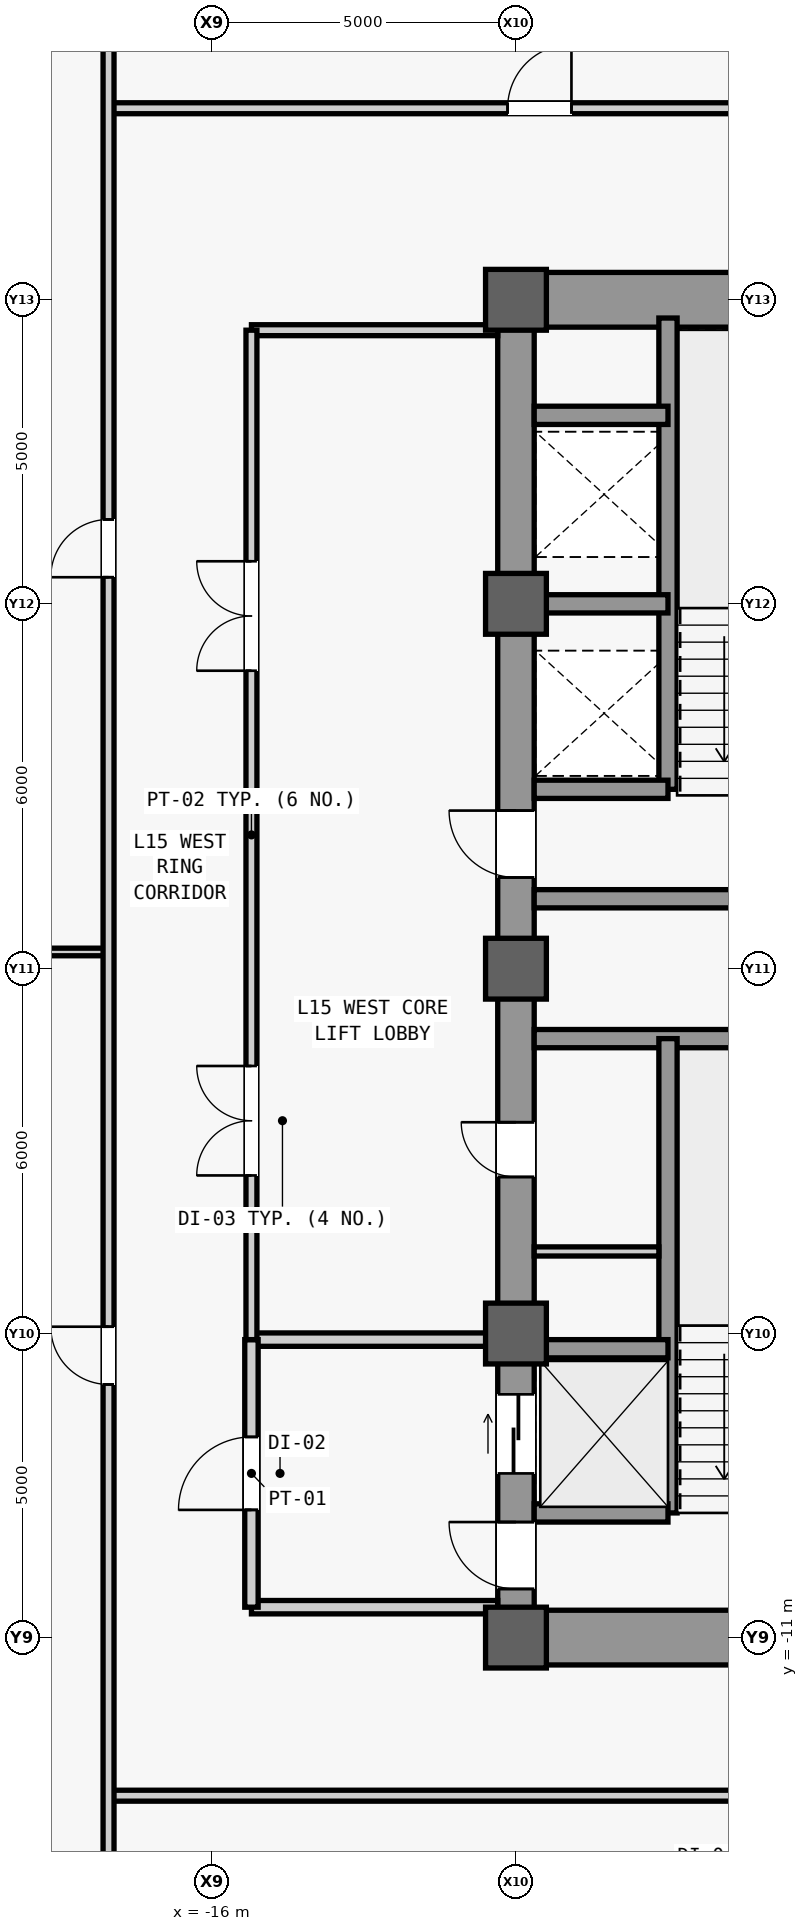
"""IFC4 building model, lengths in metres.
Left out: names, types, materials, properties, quantities, classifications, styles, units other than length and angle.
Written with IfcOpenShell. Run it as: python <this file> out.ifc"""

import sys

from ifc_helpers import new_model, si_unit, direction, frame, frame_2d, origin, origin_2d, place, context, subcontext, project, spatial, rectangle, extrude, source, transform, mapped, element, fill, save


model = new_model("IFC4")
c1 = context("Model", 3, precision=1e-05, world=origin(), true_north=direction((0.0, 1.0)))
c2 = subcontext(c1, "Body", "Model", "MODEL_VIEW")
j1 = project(units=[si_unit("LENGTHUNIT", "METRE"), si_unit("PLANEANGLEUNIT", "RADIAN")], contexts=[c1])
p1 = place(None, origin())
s1 = spatial("IfcSite", under=j1, at=p1, CompositionType="ELEMENT")
p2 = place(p1, origin())
s2 = spatial("IfcBuilding", under=s1, at=p2, CompositionType="ELEMENT")
p3 = place(p2, frame((0.0, 0.0, 70.4)))
s3 = spatial("IfcBuildingStorey", under=s2, at=p3, CompositionType="ELEMENT", Elevation=70.4)
m1 = source(origin(), c2, "Body", "SweptSolid", [
    extrude(rectangle(XDim=22.0, YDim=0.6, at=frame_2d((11.0, 0.0))), origin(), (0.0, 0.0, 1.0), 3.94),
])
p4 = place(p3, frame((-11.0, -11.0, 0.0), z_axis=(0.0, 0.0, 1.0), x_axis=(0.0, 1.0, 0.0)))
e1 = element("IfcWall", 1, at=p4, inside=s3, PredefinedType="SHEAR", context=c2, shape_type="MappedRepresentation", body=[
    mapped(m1, transform((0.0, 0.0, 0.0), scale=1.0)),
])
m2 = source(origin(), c2, "Body", "SweptSolid", [
    extrude(rectangle(XDim=1.1, YDim=2.2, at=frame_2d((0.55, 1.1))), frame((0.0, 0.31, 0.0), z_axis=(0.0, -1.0, 0.0), x_axis=(1.0, 0.0, 0.0)), (0.0, 0.0, 1.0), 0.62),
])
p5 = place(p4, frame((0.8, 0.0, 0.0)))
e2 = element("IfcOpeningElement", 2, at=p5, cuts=e1, PredefinedType="OPENING", context=c2, shape_type="MappedRepresentation", body=[
    mapped(m2, transform((0.0, 0.0, 0.0), scale=1.0)),
])
p6 = place(p4, frame((12.5, 0.0, 0.0)))
e3 = element("IfcOpeningElement", 3, at=p6, cuts=e1, PredefinedType="OPENING", context=c2, shape_type="MappedRepresentation", body=[
    mapped(m2, transform((0.0, 0.0, 0.0), scale=1.0)),
])
m3 = source(origin(), c2, "Body", "SweptSolid", [
    extrude(rectangle(XDim=0.9, YDim=2.15, at=frame_2d((0.45, 1.075))), frame((0.0, 0.31, 0.0), z_axis=(0.0, -1.0, 0.0), x_axis=(1.0, 0.0, 0.0)), (0.0, 0.0, 1.0), 0.62),
])
p7 = place(p4, frame((7.575, 0.0, 0.0)))
e4 = element("IfcOpeningElement", 4, at=p7, cuts=e1, PredefinedType="OPENING", context=c2, shape_type="MappedRepresentation", body=[
    mapped(m3, transform((0.0, 0.0, 0.0), scale=1.0)),
])
m4 = source(origin(), c2, "Body", "SweptSolid", [
    extrude(rectangle(XDim=1.3, YDim=2.3, at=frame_2d((0.65, 1.15))), frame((0.0, 0.31, 0.0), z_axis=(0.0, -1.0, 0.0), x_axis=(1.0, 0.0, 0.0)), (0.0, 0.0, 1.0), 0.62),
])
p8 = place(p4, frame((2.7, 0.0, 0.0)))
e5 = element("IfcOpeningElement", 5, at=p8, cuts=e1, PredefinedType="OPENING", context=c2, shape_type="MappedRepresentation", body=[
    mapped(m4, transform((0.0, 0.0, 0.0), scale=1.0)),
])
m5 = source(origin(), c2, "Body", "SweptSolid", [
    extrude(rectangle(XDim=5.85, YDim=0.9, at=frame_2d((2.925, 0.0))), origin(), (0.0, 0.0, 1.0), 3.94),
])
for number, where, z_axis, x_axis in (
    (6, (-10.7, -11.0, 0.0), (0.0, 0.0, 1.0), (1.0, 0.0, 0.0)),
    (7, (-10.7, 11.0, 0.0), (0.0, 0.0, 1.0), (1.0, 0.0, 0.0)),
):
    element("IfcWall", number, at=place(p3, frame(where, z_axis=z_axis, x_axis=x_axis)), inside=s3, PredefinedType="SHEAR", context=c2, shape_type="MappedRepresentation", body=[
        mapped(m5, transform((0.0, 0.0, 0.0), scale=1.0)),
    ])
m6 = source(origin(), c2, "Body", "SweptSolid", [
    extrude(rectangle(XDim=5.6, YDim=0.3, at=frame_2d((2.8, 0.0))), origin(), (0.0, 0.0, 1.0), 3.94),
])
for number, where, z_axis, x_axis in (
    (8, (-10.7, -1.15, 0.0), (0.0, 0.0, 1.0), (1.0, 0.0, 0.0)),
    (9, (-10.7, 1.15, 0.0), (0.0, 0.0, 1.0), (1.0, 0.0, 0.0)),
):
    element("IfcWall", number, at=place(p3, frame(where, z_axis=z_axis, x_axis=x_axis)), inside=s3, PredefinedType="SHEAR", context=c2, shape_type="MappedRepresentation", body=[
        mapped(m6, transform((0.0, 0.0, 0.0), scale=1.0)),
    ])
m7 = source(origin(), c2, "Body", "SweptSolid", [
    extrude(rectangle(XDim=1.0, YDim=1.0, at=origin_2d()), origin(), (0.0, 0.0, 1.0), 4.2),
])
for number, where, z_axis, x_axis in (
    (10, (-11.0, -11.0, 0.0), (0.0, 0.0, 1.0), (1.0, 0.0, 0.0)),
    (11, (-11.0, -6.0, 0.0), (0.0, 0.0, 1.0), (1.0, 0.0, 0.0)),
    (12, (-11.0, 0.0, 0.0), (0.0, 0.0, 1.0), (1.0, 0.0, 0.0)),
    (13, (-11.0, 6.0, 0.0), (0.0, 0.0, 1.0), (1.0, 0.0, 0.0)),
    (14, (-11.0, 11.0, 0.0), (0.0, 0.0, 1.0), (1.0, 0.0, 0.0)),
):
    element("IfcColumn", number, at=place(p3, frame(where, z_axis=z_axis, x_axis=x_axis)), inside=s3, PredefinedType="COLUMN", context=c2, shape_type="MappedRepresentation", body=[
        mapped(m7, transform((0.0, 0.0, 0.0), scale=1.0)),
    ])
m8 = source(origin(), c2, "Body", "SweptSolid", [
    extrude(rectangle(XDim=7.8, YDim=0.3, at=frame_2d((3.9, 0.0))), origin(), (0.0, 0.0, 1.0), 3.94),
])
p9 = place(p3, frame((-8.5, -8.95, 0.0), z_axis=(0.0, 0.0, 1.0), x_axis=(0.0, 1.0, 0.0)))
e15 = element("IfcWall", 15, at=p9, inside=s3, PredefinedType="SHEAR", context=c2, shape_type="MappedRepresentation", body=[
    mapped(m8, transform((0.0, 0.0, 0.0), scale=1.0)),
])
m9 = source(origin(), c2, "Body", "SweptSolid", [
    extrude(rectangle(XDim=2.2, YDim=0.3, at=frame_2d((1.1, 0.0))), origin(), (0.0, 0.0, 1.0), 3.94),
])
for number, where, z_axis, x_axis in (
    (16, (-10.7, -8.95, 0.0), (0.0, 0.0, 1.0), (1.0, 0.0, 0.0)),
    (17, (-10.7, -6.25, 0.0), (0.0, 0.0, 1.0), (1.0, 0.0, 0.0)),
):
    element("IfcWall", number, at=place(p3, frame(where, z_axis=z_axis, x_axis=x_axis)), inside=s3, PredefinedType="SHEAR", context=c2, shape_type="MappedRepresentation", body=[
        mapped(m9, transform((0.0, 0.0, 0.0), scale=1.0)),
    ])
m10 = source(origin(), c2, "Body", "SweptSolid", [
    extrude(rectangle(XDim=7.75, YDim=0.3, at=frame_2d((3.875, 0.0))), origin(), (0.0, 0.0, 1.0), 3.94),
])
p10 = place(p3, frame((-8.5, 2.95, 0.0), z_axis=(0.0, 0.0, 1.0), x_axis=(0.0, 1.0, 0.0)))
e18 = element("IfcWall", 18, at=p10, inside=s3, PredefinedType="SHEAR", context=c2, shape_type="MappedRepresentation", body=[
    mapped(m10, transform((0.0, 0.0, 0.0), scale=1.0)),
])
for number, where, z_axis, x_axis in (
    (19, (-10.7, 2.95, 0.0), (0.0, 0.0, 1.0), (1.0, 0.0, 0.0)),
    (20, (-10.7, 6.0, 0.0), (0.0, 0.0, 1.0), (1.0, 0.0, 0.0)),
    (21, (-10.7, 9.1, 0.0), (0.0, 0.0, 1.0), (1.0, 0.0, 0.0)),
):
    element("IfcWall", number, at=place(p3, frame(where, z_axis=z_axis, x_axis=x_axis)), inside=s3, PredefinedType="SHEAR", context=c2, shape_type="MappedRepresentation", body=[
        mapped(m9, transform((0.0, 0.0, 0.0), scale=1.0)),
    ])
m11 = source(origin(), c2, "Body", "SweptSolid", [
    extrude(rectangle(XDim=2.05, YDim=0.15, at=frame_2d((1.025, 0.0))), origin(), (0.0, 0.0, 1.0), 3.94),
])
p11 = place(p3, frame((-10.7, -4.65, 0.0), z_axis=(0.0, 0.0, 1.0), x_axis=(1.0, 0.0, 0.0)))
e22 = element("IfcWall", 22, at=p11, inside=s3, PredefinedType="PARTITIONING", context=c2, shape_type="MappedRepresentation", body=[
    mapped(m11, transform((0.0, 0.0, 0.0), scale=1.0)),
])
m12 = source(origin(), c2, "Body", "SweptSolid", [
    extrude(rectangle(XDim=4.05, YDim=0.22, at=frame_2d((2.025, 0.0))), origin(), (0.0, 0.0, 1.0), 3.94),
])
p12 = place(p3, frame((-15.35, -10.5, 0.0), z_axis=(0.0, 0.0, 1.0), x_axis=(1.0, 0.0, 0.0)))
e23 = element("IfcWall", 23, at=p12, inside=s3, PredefinedType="PARTITIONING", context=c2, shape_type="MappedRepresentation", body=[
    mapped(m12, transform((0.0, 0.0, 0.0), scale=1.0)),
])
m13 = source(origin(), c2, "Body", "SweptSolid", [
    extrude(rectangle(XDim=4.05, YDim=0.22, at=frame_2d((2.025, 0.0))), origin(), (0.0, 0.0, 1.0), 3.085),
])
p13 = place(p3, frame((-15.35, -6.1, 0.0), z_axis=(0.0, 0.0, 1.0), x_axis=(1.0, 0.0, 0.0)))
e24 = element("IfcWall", 24, at=p13, inside=s3, PredefinedType="PARTITIONING", context=c2, shape_type="MappedRepresentation", body=[
    mapped(m13, transform((0.0, 0.0, 0.0), scale=1.0)),
])
m14 = source(origin(), c2, "Body", "SweptSolid", [
    extrude(rectangle(XDim=4.4, YDim=0.22, at=frame_2d((2.2, 0.0))), origin(), (0.0, 0.0, 1.0), 3.94),
])
p14 = place(p3, frame((-15.35, -10.5, 0.0), z_axis=(0.0, 0.0, 1.0), x_axis=(0.0, 1.0, 0.0)))
e25 = element("IfcWall", 25, at=p14, inside=s3, PredefinedType="PARTITIONING", context=c2, shape_type="MappedRepresentation", body=[
    mapped(m14, transform((0.0, 0.0, 0.0), scale=1.0)),
])
m15 = source(origin(), c2, "Body", "SweptSolid", [
    extrude(rectangle(XDim=1.2, YDim=2.2, at=frame_2d((0.6, 1.1))), frame((0.0, 0.12, 0.0), z_axis=(0.0, -1.0, 0.0), x_axis=(1.0, 0.0, 0.0)), (0.0, 0.0, 1.0), 0.24),
])
p15 = place(p14, frame((1.6, 0.0, 0.0)))
e26 = element("IfcOpeningElement", 26, at=p15, cuts=e25, PredefinedType="OPENING", context=c2, shape_type="MappedRepresentation", body=[
    mapped(m15, transform((0.0, 0.0, 0.0), scale=1.0)),
])
m16 = source(origin(), c2, "Body", "SweptSolid", [
    extrude(rectangle(XDim=4.05, YDim=0.18, at=frame_2d((2.025, 0.0))), origin(), (0.0, 0.0, 1.0), 3.94),
])
p16 = place(p3, frame((-15.35, 10.5, 0.0), z_axis=(0.0, 0.0, 1.0), x_axis=(1.0, 0.0, 0.0)))
e27 = element("IfcWall", 27, at=p16, inside=s3, PredefinedType="PARTITIONING", context=c2, shape_type="MappedRepresentation", body=[
    mapped(m16, transform((0.0, 0.0, 0.0), scale=1.0)),
])
m17 = source(origin(), c2, "Body", "SweptSolid", [
    extrude(rectangle(XDim=16.6, YDim=0.18, at=frame_2d((8.3, 0.0))), origin(), (0.0, 0.0, 1.0), 3.94),
])
p17 = place(p3, frame((-15.35, -6.1, 0.0), z_axis=(0.0, 0.0, 1.0), x_axis=(0.0, 1.0, 0.0)))
e28 = element("IfcWall", 28, at=p17, inside=s3, PredefinedType="PARTITIONING", context=c2, shape_type="MappedRepresentation", body=[
    mapped(m17, transform((0.0, 0.0, 0.0), scale=1.0)),
])
m18 = source(origin(), c2, "Body", "SweptSolid", [
    extrude(rectangle(XDim=1.8, YDim=2.25, at=frame_2d((0.9, 1.125))), frame((0.0, 0.1, 0.0), z_axis=(0.0, -1.0, 0.0), x_axis=(1.0, 0.0, 0.0)), (0.0, 0.0, 1.0), 0.2),
])
p18 = place(p17, frame((2.7, 0.0, 0.0)))
e29 = element("IfcOpeningElement", 29, at=p18, cuts=e28, PredefinedType="OPENING", context=c2, shape_type="MappedRepresentation", body=[
    mapped(m18, transform((0.0, 0.0, 0.0), scale=1.0)),
])
p19 = place(p17, frame((11.0, 0.0, 0.0)))
e30 = element("IfcOpeningElement", 30, at=p19, cuts=e28, PredefinedType="OPENING", context=c2, shape_type="MappedRepresentation", body=[
    mapped(m18, transform((0.0, 0.0, 0.0), scale=1.0)),
])
m19 = source(origin(), c2, "Body", "SweptSolid", [
    extrude(rectangle(XDim=36.25, YDim=0.18, at=frame_2d((18.125, 0.0))), origin(), (0.0, 0.0, 1.0), 3.94),
])
p20 = place(p3, frame((-17.7, -13.6, 0.0), z_axis=(0.0, 0.0, 1.0), x_axis=(1.0, 0.0, 0.0)))
e31 = element("IfcWall", 31, at=p20, inside=s3, PredefinedType="PARTITIONING", context=c2, shape_type="MappedRepresentation", body=[
    mapped(m19, transform((0.0, 0.0, 0.0), scale=1.0)),
])
m20 = source(origin(), c2, "Body", "SweptSolid", [
    extrude(rectangle(XDim=1.05, YDim=2.2, at=frame_2d((0.525, 1.1))), frame((0.0, 0.1, 0.0), z_axis=(0.0, -1.0, 0.0), x_axis=(1.0, 0.0, 0.0)), (0.0, 0.0, 1.0), 0.2),
])
p21 = place(p20, frame((10.55, 0.0, 0.0)))
e32 = element("IfcOpeningElement", 32, at=p21, cuts=e31, PredefinedType="OPENING", context=c2, shape_type="MappedRepresentation", body=[
    mapped(m20, transform((0.0, 0.0, 0.0), scale=1.0)),
])
p22 = place(p20, frame((24.95, 0.0, 0.0)))
e33 = element("IfcOpeningElement", 33, at=p22, cuts=e31, PredefinedType="OPENING", context=c2, shape_type="MappedRepresentation", body=[
    mapped(m20, transform((0.0, 0.0, 0.0), scale=1.0)),
])
p23 = place(p3, frame((-17.7, 14.15, 0.0), z_axis=(0.0, 0.0, 1.0), x_axis=(1.0, 0.0, 0.0)))
e34 = element("IfcWall", 34, at=p23, inside=s3, PredefinedType="PARTITIONING", context=c2, shape_type="MappedRepresentation", body=[
    mapped(m19, transform((0.0, 0.0, 0.0), scale=1.0)),
])
p24 = place(p23, frame((6.562, 0.0, 0.0)))
e35 = element("IfcOpeningElement", 35, at=p24, cuts=e34, PredefinedType="OPENING", context=c2, shape_type="MappedRepresentation", body=[
    mapped(m20, transform((0.0, 0.0, 0.0), scale=1.0)),
])
p25 = place(p23, frame((16.694, 0.0, 0.0)))
e36 = element("IfcOpeningElement", 36, at=p25, cuts=e34, PredefinedType="OPENING", context=c2, shape_type="MappedRepresentation", body=[
    mapped(m20, transform((0.0, 0.0, 0.0), scale=1.0)),
])
p26 = place(p23, frame((27.306, 0.0, 0.0)))
e37 = element("IfcOpeningElement", 37, at=p26, cuts=e34, PredefinedType="OPENING", context=c2, shape_type="MappedRepresentation", body=[
    mapped(m20, transform((0.0, 0.0, 0.0), scale=1.0)),
])
m21 = source(origin(), c2, "Body", "SweptSolid", [
    extrude(rectangle(XDim=14.3, YDim=0.125, at=frame_2d((7.15, 0.0))), origin(), (0.0, 0.0, 1.0), 3.085),
])
p27 = place(p3, frame((-32.0, 0.275, 0.0), z_axis=(0.0, 0.0, 1.0), x_axis=(1.0, 0.0, 0.0)))
e38 = element("IfcWall", 38, at=p27, inside=s3, PredefinedType="PARTITIONING", context=c2, shape_type="MappedRepresentation", body=[
    mapped(m21, transform((0.0, 0.0, 0.0), scale=1.0)),
])
m22 = source(origin(), c2, "Body", "SweptSolid", [
    extrude(rectangle(XDim=57.0, YDim=0.18, at=frame_2d((28.5, 0.0))), origin(), (0.0, 0.0, 1.0), 3.94),
])
p28 = place(p3, frame((-17.7, -28.5, 0.0), z_axis=(0.0, 0.0, 1.0), x_axis=(0.0, 1.0, 0.0)))
e39 = element("IfcWall", 39, at=p28, inside=s3, PredefinedType="PARTITIONING", context=c2, shape_type="MappedRepresentation", body=[
    mapped(m22, transform((0.0, 0.0, 0.0), scale=1.0)),
])
m23 = source(origin(), c2, "Body", "SweptSolid", [
    extrude(rectangle(XDim=0.95, YDim=2.15, at=frame_2d((0.475, 1.075))), frame((0.0, 0.1, 0.0), z_axis=(0.0, -1.0, 0.0), x_axis=(1.0, 0.0, 0.0)), (0.0, 0.0, 1.0), 0.2),
])
p29 = place(p28, frame((21.663, 0.0, 0.0)))
e40 = element("IfcOpeningElement", 40, at=p29, cuts=e39, PredefinedType="OPENING", context=c2, shape_type="MappedRepresentation", body=[
    mapped(m23, transform((0.0, 0.0, 0.0), scale=1.0)),
])
p30 = place(p28, frame((34.938, 0.0, 0.0)))
e41 = element("IfcOpeningElement", 41, at=p30, cuts=e39, PredefinedType="OPENING", context=c2, shape_type="MappedRepresentation", body=[
    mapped(m23, transform((0.0, 0.0, 0.0), scale=1.0)),
])
m24 = source(origin(), c2, "Body", "SweptSolid", [
    extrude(rectangle(XDim=1.1, YDim=2.2, at=frame_2d((0.55, 1.1))), frame((0.0, 0.025, 0.0), z_axis=(0.0, -1.0, 0.0), x_axis=(1.0, 0.0, 0.0)), (0.0, 0.0, 1.0), 0.05),
])
p31 = place(p5, origin())
e42 = element("IfcDoor", 42, at=p31, inside=s3, OperationType="SINGLE_SWING_RIGHT", PredefinedType="DOOR", context=c2, shape_type="MappedRepresentation", body=[
    mapped(m24, transform((0.0, 0.0, 0.0), scale=1.0)),
])
fill(e2, e42)
p32 = place(p6, origin())
e43 = element("IfcDoor", 43, at=p32, inside=s3, OperationType="SINGLE_SWING_RIGHT", PredefinedType="DOOR", context=c2, shape_type="MappedRepresentation", body=[
    mapped(m24, transform((0.0, 0.0, 0.0), scale=1.0)),
])
fill(e3, e43)
m25 = source(origin(), c2, "Body", "SweptSolid", [
    extrude(rectangle(XDim=0.9, YDim=2.15, at=frame_2d((0.45, 1.075))), frame((0.0, 0.025, 0.0), z_axis=(0.0, -1.0, 0.0), x_axis=(1.0, 0.0, 0.0)), (0.0, 0.0, 1.0), 0.05),
])
p33 = place(p7, origin())
e44 = element("IfcDoor", 44, at=p33, inside=s3, OperationType="SINGLE_SWING_RIGHT", PredefinedType="DOOR", context=c2, shape_type="MappedRepresentation", body=[
    mapped(m25, transform((0.0, 0.0, 0.0), scale=1.0)),
])
fill(e4, e44)
m26 = source(origin(), c2, "Body", "SweptSolid", [
    extrude(rectangle(XDim=1.2, YDim=2.2, at=frame_2d((0.6, 1.1))), frame((0.0, 0.025, 0.0), z_axis=(0.0, -1.0, 0.0), x_axis=(1.0, 0.0, 0.0)), (0.0, 0.0, 1.0), 0.05),
])
p34 = place(p15, origin())
e45 = element("IfcDoor", 45, at=p34, inside=s3, OperationType="SINGLE_SWING_LEFT", PredefinedType="DOOR", context=c2, shape_type="MappedRepresentation", body=[
    mapped(m26, transform((0.0, 0.0, 0.0), scale=1.0)),
])
fill(e26, e45)
m27 = source(origin(), c2, "Body", "SweptSolid", [
    extrude(rectangle(XDim=1.8, YDim=2.25, at=frame_2d((0.9, 1.125))), frame((0.0, 0.025, 0.0), z_axis=(0.0, -1.0, 0.0), x_axis=(1.0, 0.0, 0.0)), (0.0, 0.0, 1.0), 0.05),
])
p35 = place(p18, origin())
e46 = element("IfcDoor", 46, at=p35, inside=s3, OperationType="SINGLE_SWING_LEFT", PredefinedType="DOOR", context=c2, shape_type="MappedRepresentation", body=[
    mapped(m27, transform((0.0, 0.0, 0.0), scale=1.0)),
])
fill(e29, e46)
p36 = place(p19, origin())
e47 = element("IfcDoor", 47, at=p36, inside=s3, OperationType="SINGLE_SWING_RIGHT", PredefinedType="DOOR", context=c2, shape_type="MappedRepresentation", body=[
    mapped(m27, transform((0.0, 0.0, 0.0), scale=1.0)),
])
fill(e30, e47)
m28 = source(origin(), c2, "Body", "SweptSolid", [
    extrude(rectangle(XDim=1.05, YDim=2.2, at=frame_2d((0.525, 1.1))), frame((0.0, 0.025, 0.0), z_axis=(0.0, -1.0, 0.0), x_axis=(1.0, 0.0, 0.0)), (0.0, 0.0, 1.0), 0.05),
])
p37 = place(p24, origin())
e48 = element("IfcDoor", 48, at=p37, inside=s3, OperationType="SINGLE_SWING_RIGHT", PredefinedType="DOOR", context=c2, shape_type="MappedRepresentation", body=[
    mapped(m28, transform((0.0, 0.0, 0.0), scale=1.0)),
])
fill(e35, e48)
m29 = source(origin(), c2, "Body", "SweptSolid", [
    extrude(rectangle(XDim=0.95, YDim=2.15, at=frame_2d((0.475, 1.075))), frame((0.0, 0.025, 0.0), z_axis=(0.0, -1.0, 0.0), x_axis=(1.0, 0.0, 0.0)), (0.0, 0.0, 1.0), 0.05),
])
p38 = place(p29, origin())
e49 = element("IfcDoor", 49, at=p38, inside=s3, OperationType="SINGLE_SWING_RIGHT", PredefinedType="DOOR", context=c2, shape_type="MappedRepresentation", body=[
    mapped(m29, transform((0.0, 0.0, 0.0), scale=1.0)),
])
fill(e40, e49)
p39 = place(p30, origin())
e50 = element("IfcDoor", 50, at=p39, inside=s3, OperationType="SINGLE_SWING_LEFT", PredefinedType="DOOR", context=c2, shape_type="MappedRepresentation", body=[
    mapped(m29, transform((0.0, 0.0, 0.0), scale=1.0)),
])
fill(e41, e50)
m30 = source(origin(), c2, "Body", "SweptSolid", [
    extrude(rectangle(XDim=1.3, YDim=2.3, at=frame_2d((0.65, 1.15))), frame((0.0, 0.025, 0.0), z_axis=(0.0, -1.0, 0.0), x_axis=(1.0, 0.0, 0.0)), (0.0, 0.0, 1.0), 0.05),
])
p40 = place(p8, origin())
e51 = element("IfcDoor", 51, at=p40, inside=s3, OperationType="SLIDING_TO_LEFT", PredefinedType="DOOR", context=c2, shape_type="MappedRepresentation", body=[
    mapped(m30, transform((0.0, 0.0, 0.0), scale=1.0)),
])
fill(e5, e51)
save(model, sys.argv[1])
